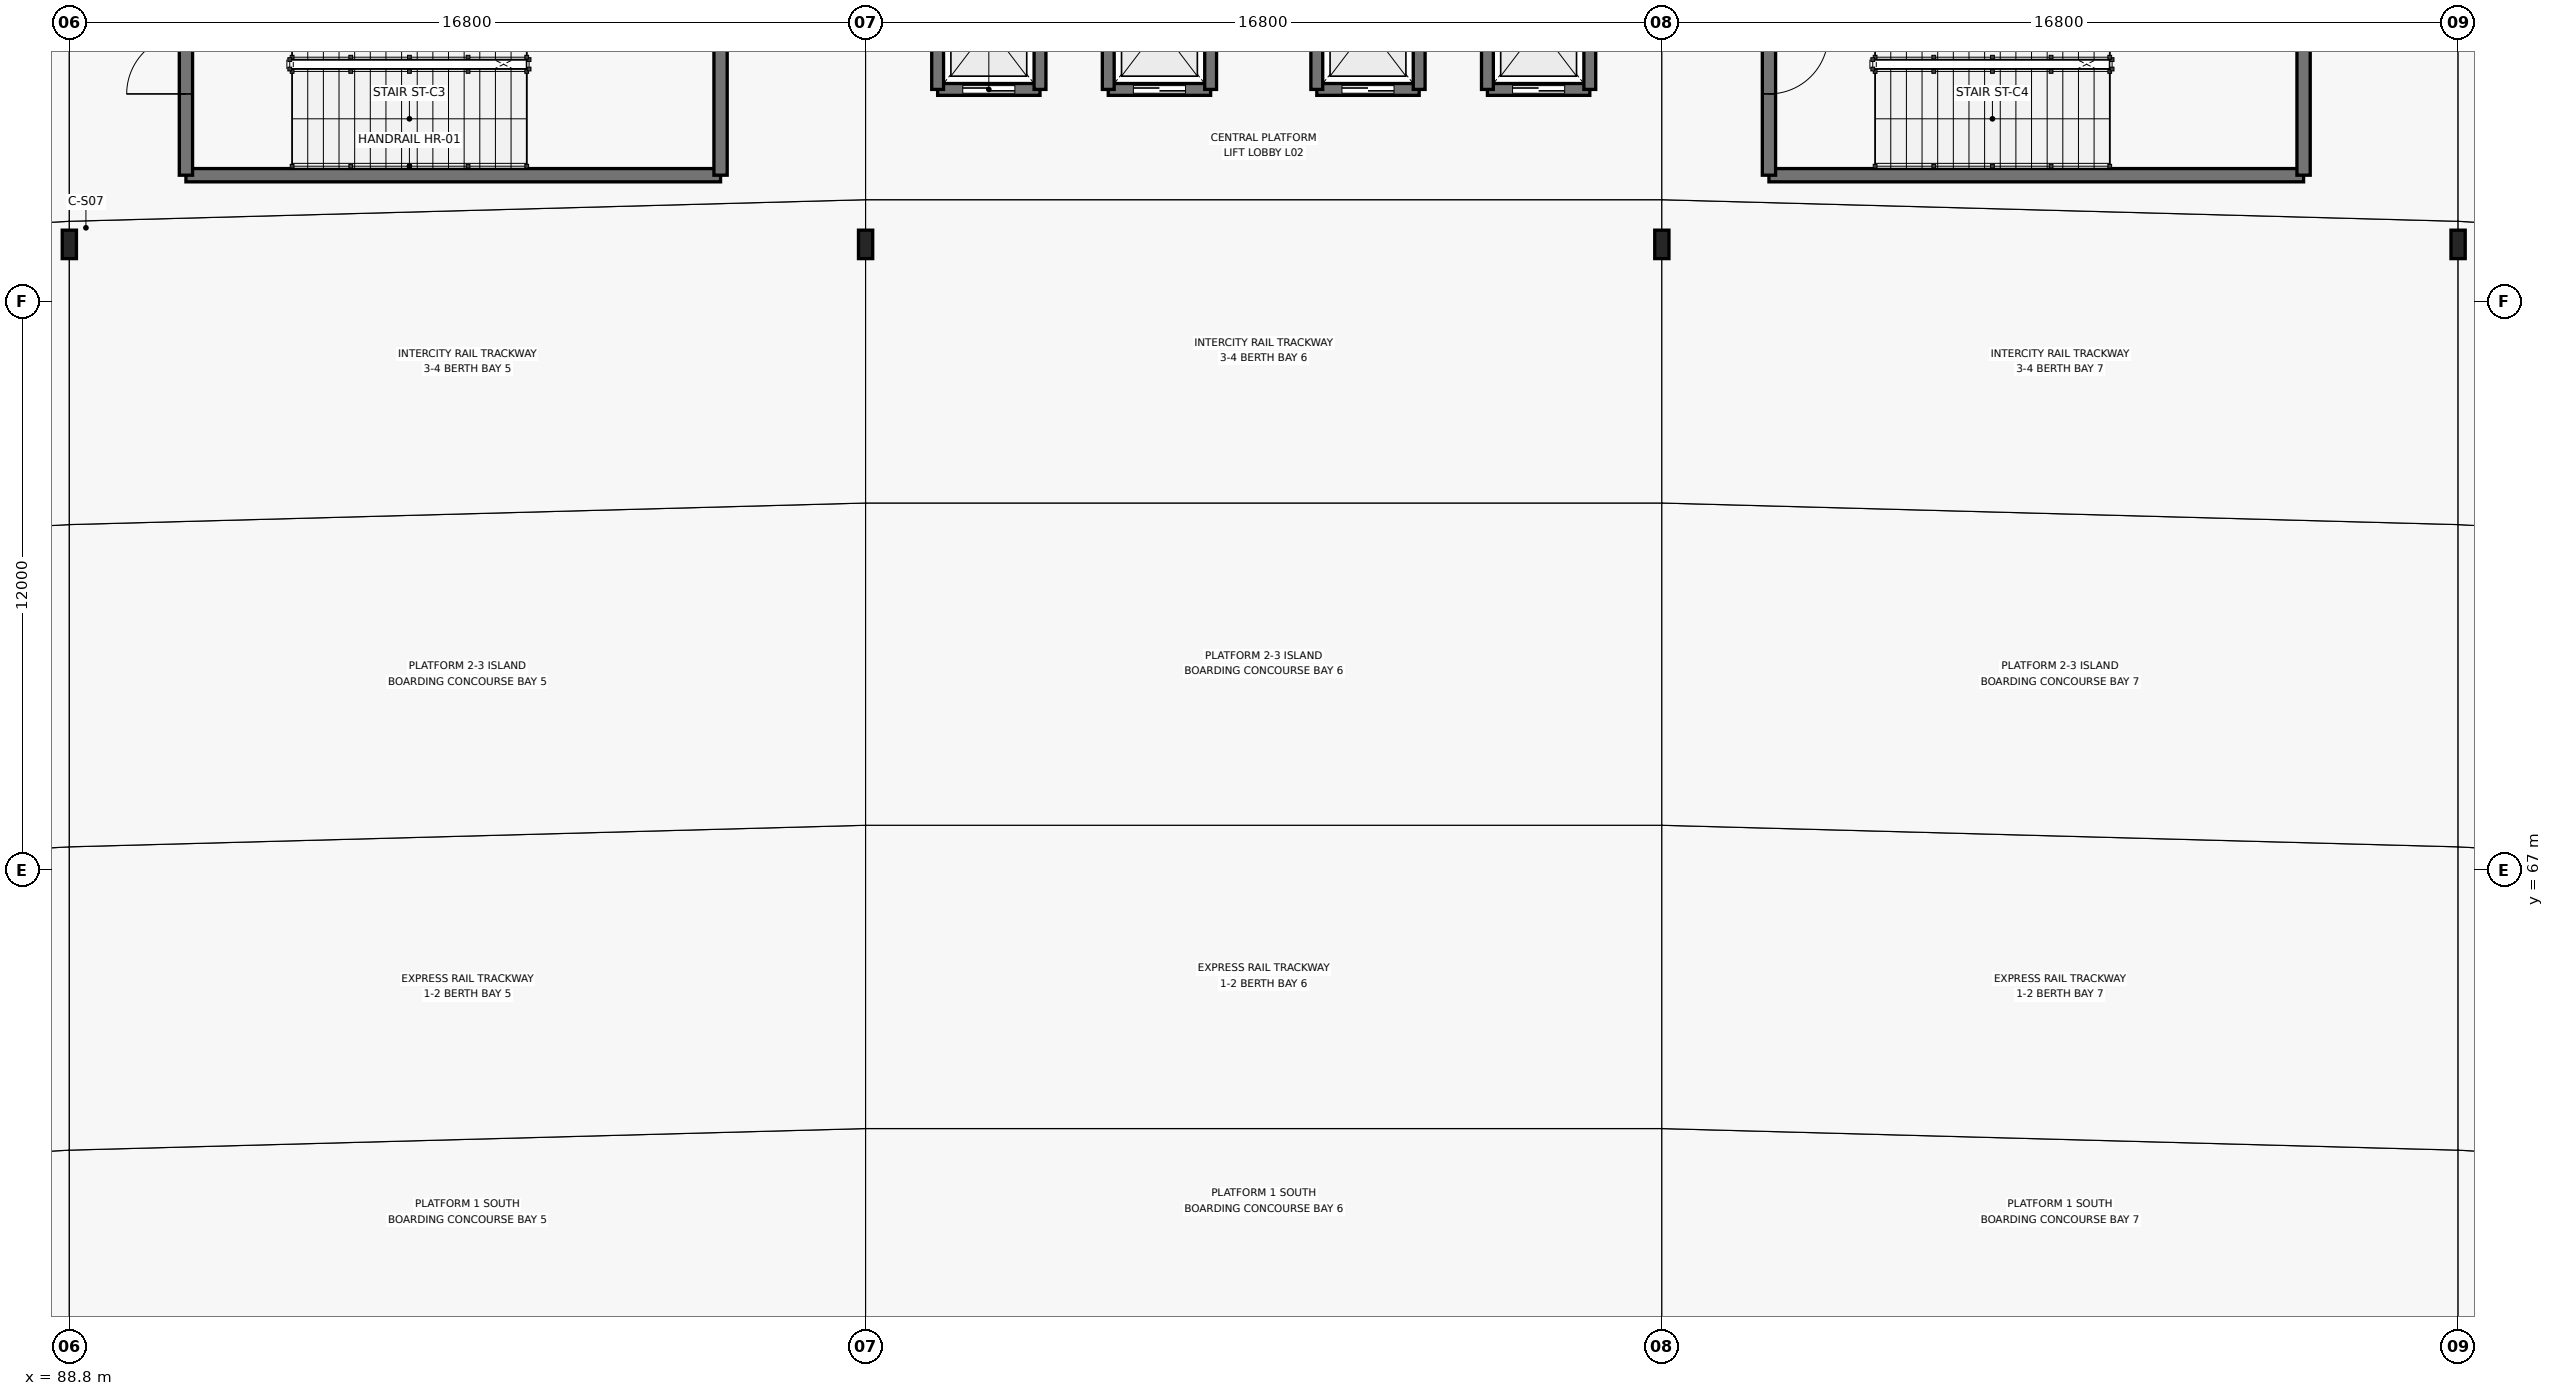
"""IFC4 building model, lengths in metres.
Left out: names, types, materials, properties, quantities, classifications, styles, units other than length and angle.
Written with IfcOpenShell. Run it as: python <this file> out.ifc"""

import sys

from ifc_helpers import new_model, si_unit, direction, frame, frame_2d, origin, origin_2d, place, context, subcontext, project, spatial, rectangle, i_section, extrude, element, fill, save


model = new_model("IFC4")
c1 = context("Model", 3, precision=1e-05, world=origin(), true_north=direction((0.0, 1.0)))
c2 = subcontext(c1, "Body", "Model", "MODEL_VIEW")
j1 = project(units=[si_unit("LENGTHUNIT", "METRE"), si_unit("PLANEANGLEUNIT", "RADIAN")], contexts=[c1])
p1 = place(None, origin())
s1 = spatial("IfcSite", under=j1, at=p1, CompositionType="ELEMENT")
p2 = place(p1, origin())
s2 = spatial("IfcBuilding", under=s1, at=p2, CompositionType="ELEMENT")
p3 = place(p2, frame((0.0, 0.0, 10.8)))
s3 = spatial("IfcBuildingStorey", under=s2, at=p3, CompositionType="ELEMENT", Elevation=10.8)
for number, where, z_axis, x_axis in (
    (1, (88.8, 80.2, 0.0), (0.0, 0.0, 1.0), (1.0, 0.0, 0.0)),
    (2, (105.6, 80.2, 0.0), (0.0, 0.0, 1.0), (1.0, 0.0, 0.0)),
    (3, (122.4, 80.2, 0.0), (0.0, 0.0, 1.0), (1.0, 0.0, 0.0)),
    (4, (139.2, 80.2, 0.0), (0.0, 0.0, 1.0), (1.0, 0.0, 0.0)),
):
    element("IfcColumn", number, at=place(p3, frame(where, z_axis=z_axis, x_axis=x_axis)), inside=s3, PredefinedType="COLUMN", context=c2, shape_type="SweptSolid", body=[
        extrude(i_section(OverallWidth=0.3, OverallDepth=0.6, WebThickness=0.015, FlangeThickness=0.03, FilletRadius=0.027, at=origin_2d()), origin(), (0.0, 0.0, 1.0), 6.0),
    ])
p4 = place(p3, frame((91.26, 81.66, 0.0), z_axis=(0.0, 0.0, 1.0), x_axis=(1.0, 0.0, 0.0)))
e5 = element("IfcWall", 5, at=p4, inside=s3, PredefinedType="SHEAR", context=c2, shape_type="SweptSolid", body=[
    extrude(rectangle(XDim=11.28, YDim=0.28, at=frame_2d((5.64, 0.0))), origin(), (0.0, 0.0, 1.0), 5.72),
])
p5 = place(p3, frame((102.54, 81.66, 0.0), z_axis=(0.0, 0.0, 1.0), x_axis=(0.0, 1.0, 0.0)))
e6 = element("IfcWall", 6, at=p5, inside=s3, PredefinedType="SHEAR", context=c2, shape_type="SweptSolid", body=[
    extrude(rectangle(XDim=4.68, YDim=0.28, at=frame_2d((2.34, 0.0))), origin(), (0.0, 0.0, 1.0), 5.72),
])
p6 = place(p3, frame((91.26, 86.34, 0.0), z_axis=(0.0, 0.0, 1.0), x_axis=(0.0, -1.0, 0.0)))
e7 = element("IfcWall", 7, at=p6, inside=s3, PredefinedType="SHEAR", context=c2, shape_type="SweptSolid", body=[
    extrude(rectangle(XDim=4.68, YDim=0.28, at=frame_2d((2.34, 0.0))), origin(), (0.0, 0.0, 1.0), 5.72),
])
p7 = place(p6, frame((1.715, 0.0, 0.0)))
e8 = element("IfcOpeningElement", 8, at=p7, cuts=e7, PredefinedType="OPENING", context=c2, shape_type="SweptSolid", body=[
    extrude(rectangle(XDim=1.25, YDim=2.2, at=frame_2d((0.625, 1.1))), frame((0.0, 0.15, 0.0), z_axis=(0.0, -1.0, 0.0), x_axis=(1.0, 0.0, 0.0)), (0.0, 0.0, 1.0), 0.3),
])
p8 = place(p3, frame((124.66, 81.66, 0.0), z_axis=(0.0, 0.0, 1.0), x_axis=(1.0, 0.0, 0.0)))
e9 = element("IfcWall", 9, at=p8, inside=s3, PredefinedType="SHEAR", context=c2, shape_type="SweptSolid", body=[
    extrude(rectangle(XDim=11.28, YDim=0.28, at=frame_2d((5.64, 0.0))), origin(), (0.0, 0.0, 1.0), 5.72),
])
p9 = place(p3, frame((135.94, 81.66, 0.0), z_axis=(0.0, 0.0, 1.0), x_axis=(0.0, 1.0, 0.0)))
e10 = element("IfcWall", 10, at=p9, inside=s3, PredefinedType="SHEAR", context=c2, shape_type="SweptSolid", body=[
    extrude(rectangle(XDim=4.68, YDim=0.28, at=frame_2d((2.34, 0.0))), origin(), (0.0, 0.0, 1.0), 5.72),
])
p10 = place(p3, frame((124.66, 86.34, 0.0), z_axis=(0.0, 0.0, 1.0), x_axis=(0.0, -1.0, 0.0)))
e11 = element("IfcWall", 11, at=p10, inside=s3, PredefinedType="SHEAR", context=c2, shape_type="SweptSolid", body=[
    extrude(rectangle(XDim=4.68, YDim=0.28, at=frame_2d((2.34, 0.0))), origin(), (0.0, 0.0, 1.0), 5.72),
])
p11 = place(p10, frame((1.715, 0.0, 0.0)))
e12 = element("IfcOpeningElement", 12, at=p11, cuts=e11, PredefinedType="OPENING", context=c2, shape_type="SweptSolid", body=[
    extrude(rectangle(XDim=1.25, YDim=2.2, at=frame_2d((0.625, 1.1))), frame((0.0, 0.15, 0.0), z_axis=(0.0, -1.0, 0.0), x_axis=(1.0, 0.0, 0.0)), (0.0, 0.0, 1.0), 0.3),
])
p12 = place(p3, frame((107.12, 83.47, 0.0), z_axis=(0.0, 0.0, 1.0), x_axis=(1.0, 0.0, 0.0)))
e13 = element("IfcWall", 13, at=p12, inside=s3, PredefinedType="SHEAR", context=c2, shape_type="SweptSolid", body=[
    extrude(rectangle(XDim=2.16, YDim=0.25, at=frame_2d((1.08, 0.0))), origin(), (0.0, 0.0, 1.0), 5.72),
])
p13 = place(p12, frame((0.53, 0.0, 0.0)))
e14 = element("IfcOpeningElement", 14, at=p13, cuts=e13, PredefinedType="OPENING", context=c2, shape_type="SweptSolid", body=[
    extrude(rectangle(XDim=1.1, YDim=2.2, at=frame_2d((0.55, 1.1))), frame((0.0, 0.135, 0.0), z_axis=(0.0, -1.0, 0.0), x_axis=(1.0, 0.0, 0.0)), (0.0, 0.0, 1.0), 0.27),
])
for number, where, z_axis, x_axis in (
    (15, (109.28, 83.47, 0.0), (0.0, 0.0, 1.0), (0.0, 1.0, 0.0)),
    (16, (107.12, 86.13, 0.0), (0.0, 0.0, 1.0), (0.0, -1.0, 0.0)),
):
    element("IfcWall", number, at=place(p3, frame(where, z_axis=z_axis, x_axis=x_axis)), inside=s3, PredefinedType="SHEAR", context=c2, shape_type="SweptSolid", body=[
        extrude(rectangle(XDim=2.66, YDim=0.25, at=frame_2d((1.33, 0.0))), origin(), (0.0, 0.0, 1.0), 5.72),
    ])
p14 = place(p3, frame((110.72, 83.47, 0.0), z_axis=(0.0, 0.0, 1.0), x_axis=(1.0, 0.0, 0.0)))
e17 = element("IfcWall", 17, at=p14, inside=s3, PredefinedType="SHEAR", context=c2, shape_type="SweptSolid", body=[
    extrude(rectangle(XDim=2.16, YDim=0.25, at=frame_2d((1.08, 0.0))), origin(), (0.0, 0.0, 1.0), 5.72),
])
p15 = place(p14, frame((0.53, 0.0, 0.0)))
e18 = element("IfcOpeningElement", 18, at=p15, cuts=e17, PredefinedType="OPENING", context=c2, shape_type="SweptSolid", body=[
    extrude(rectangle(XDim=1.1, YDim=2.2, at=frame_2d((0.55, 1.1))), frame((0.0, 0.135, 0.0), z_axis=(0.0, -1.0, 0.0), x_axis=(1.0, 0.0, 0.0)), (0.0, 0.0, 1.0), 0.27),
])
for number, where, z_axis, x_axis in (
    (19, (112.88, 83.47, 0.0), (0.0, 0.0, 1.0), (0.0, 1.0, 0.0)),
    (20, (110.72, 86.13, 0.0), (0.0, 0.0, 1.0), (0.0, -1.0, 0.0)),
):
    element("IfcWall", number, at=place(p3, frame(where, z_axis=z_axis, x_axis=x_axis)), inside=s3, PredefinedType="SHEAR", context=c2, shape_type="SweptSolid", body=[
        extrude(rectangle(XDim=2.66, YDim=0.25, at=frame_2d((1.33, 0.0))), origin(), (0.0, 0.0, 1.0), 5.72),
    ])
p16 = place(p3, frame((115.12, 83.47, 0.0), z_axis=(0.0, 0.0, 1.0), x_axis=(1.0, 0.0, 0.0)))
e21 = element("IfcWall", 21, at=p16, inside=s3, PredefinedType="SHEAR", context=c2, shape_type="SweptSolid", body=[
    extrude(rectangle(XDim=2.16, YDim=0.25, at=frame_2d((1.08, 0.0))), origin(), (0.0, 0.0, 1.0), 5.72),
])
p17 = place(p16, frame((0.53, 0.0, 0.0)))
e22 = element("IfcOpeningElement", 22, at=p17, cuts=e21, PredefinedType="OPENING", context=c2, shape_type="SweptSolid", body=[
    extrude(rectangle(XDim=1.1, YDim=2.2, at=frame_2d((0.55, 1.1))), frame((0.0, 0.135, 0.0), z_axis=(0.0, -1.0, 0.0), x_axis=(1.0, 0.0, 0.0)), (0.0, 0.0, 1.0), 0.27),
])
for number, where, z_axis, x_axis in (
    (23, (117.28, 83.47, 0.0), (0.0, 0.0, 1.0), (0.0, 1.0, 0.0)),
    (24, (115.12, 86.13, 0.0), (0.0, 0.0, 1.0), (0.0, -1.0, 0.0)),
):
    element("IfcWall", number, at=place(p3, frame(where, z_axis=z_axis, x_axis=x_axis)), inside=s3, PredefinedType="SHEAR", context=c2, shape_type="SweptSolid", body=[
        extrude(rectangle(XDim=2.66, YDim=0.25, at=frame_2d((1.33, 0.0))), origin(), (0.0, 0.0, 1.0), 5.72),
    ])
p18 = place(p3, frame((118.72, 83.47, 0.0), z_axis=(0.0, 0.0, 1.0), x_axis=(1.0, 0.0, 0.0)))
e25 = element("IfcWall", 25, at=p18, inside=s3, PredefinedType="SHEAR", context=c2, shape_type="SweptSolid", body=[
    extrude(rectangle(XDim=2.16, YDim=0.25, at=frame_2d((1.08, 0.0))), origin(), (0.0, 0.0, 1.0), 5.72),
])
p19 = place(p18, frame((0.53, 0.0, 0.0)))
e26 = element("IfcOpeningElement", 26, at=p19, cuts=e25, PredefinedType="OPENING", context=c2, shape_type="SweptSolid", body=[
    extrude(rectangle(XDim=1.1, YDim=2.2, at=frame_2d((0.55, 1.1))), frame((0.0, 0.135, 0.0), z_axis=(0.0, -1.0, 0.0), x_axis=(1.0, 0.0, 0.0)), (0.0, 0.0, 1.0), 0.27),
])
for number, where, z_axis, x_axis in (
    (27, (120.88, 83.47, 0.0), (0.0, 0.0, 1.0), (0.0, 1.0, 0.0)),
    (28, (118.72, 86.13, 0.0), (0.0, 0.0, 1.0), (0.0, -1.0, 0.0)),
):
    element("IfcWall", number, at=place(p3, frame(where, z_axis=z_axis, x_axis=x_axis)), inside=s3, PredefinedType="SHEAR", context=c2, shape_type="SweptSolid", body=[
        extrude(rectangle(XDim=2.66, YDim=0.25, at=frame_2d((1.33, 0.0))), origin(), (0.0, 0.0, 1.0), 5.72),
    ])
p20 = place(p7, origin())
e29 = element("IfcDoor", 29, at=p20, inside=s3, OperationType="SINGLE_SWING_RIGHT", PredefinedType="DOOR", context=c2, shape_type="SweptSolid", body=[
    extrude(rectangle(XDim=1.25, YDim=2.2, at=frame_2d((0.625, 1.1))), frame((0.0, 0.025, 0.0), z_axis=(0.0, -1.0, 0.0), x_axis=(1.0, 0.0, 0.0)), (0.0, 0.0, 1.0), 0.05),
])
fill(e8, e29)
p21 = place(p11, origin())
e30 = element("IfcDoor", 30, at=p21, inside=s3, OperationType="SINGLE_SWING_LEFT", PredefinedType="DOOR", context=c2, shape_type="SweptSolid", body=[
    extrude(rectangle(XDim=1.25, YDim=2.2, at=frame_2d((0.625, 1.1))), frame((0.0, 0.025, 0.0), z_axis=(0.0, -1.0, 0.0), x_axis=(1.0, 0.0, 0.0)), (0.0, 0.0, 1.0), 0.05),
])
fill(e12, e30)
p22 = place(p13, origin())
e31 = element("IfcDoor", 31, at=p22, inside=s3, OperationType="SLIDING_TO_RIGHT", PredefinedType="DOOR", context=c2, shape_type="SweptSolid", body=[
    extrude(rectangle(XDim=1.1, YDim=2.2, at=frame_2d((0.55, 1.1))), frame((0.0, 0.025, 0.0), z_axis=(0.0, -1.0, 0.0), x_axis=(1.0, 0.0, 0.0)), (0.0, 0.0, 1.0), 0.05),
])
fill(e14, e31)
p23 = place(p15, origin())
e32 = element("IfcDoor", 32, at=p23, inside=s3, OperationType="SLIDING_TO_RIGHT", PredefinedType="DOOR", context=c2, shape_type="SweptSolid", body=[
    extrude(rectangle(XDim=1.1, YDim=2.2, at=frame_2d((0.55, 1.1))), frame((0.0, 0.025, 0.0), z_axis=(0.0, -1.0, 0.0), x_axis=(1.0, 0.0, 0.0)), (0.0, 0.0, 1.0), 0.05),
])
fill(e18, e32)
p24 = place(p17, origin())
e33 = element("IfcDoor", 33, at=p24, inside=s3, OperationType="SLIDING_TO_RIGHT", PredefinedType="DOOR", context=c2, shape_type="SweptSolid", body=[
    extrude(rectangle(XDim=1.1, YDim=2.2, at=frame_2d((0.55, 1.1))), frame((0.0, 0.025, 0.0), z_axis=(0.0, -1.0, 0.0), x_axis=(1.0, 0.0, 0.0)), (0.0, 0.0, 1.0), 0.05),
])
fill(e22, e33)
p25 = place(p19, origin())
e34 = element("IfcDoor", 34, at=p25, inside=s3, OperationType="SLIDING_TO_RIGHT", PredefinedType="DOOR", context=c2, shape_type="SweptSolid", body=[
    extrude(rectangle(XDim=1.1, YDim=2.2, at=frame_2d((0.55, 1.1))), frame((0.0, 0.025, 0.0), z_axis=(0.0, -1.0, 0.0), x_axis=(1.0, 0.0, 0.0)), (0.0, 0.0, 1.0), 0.05),
])
fill(e26, e34)
save(model, sys.argv[1])
